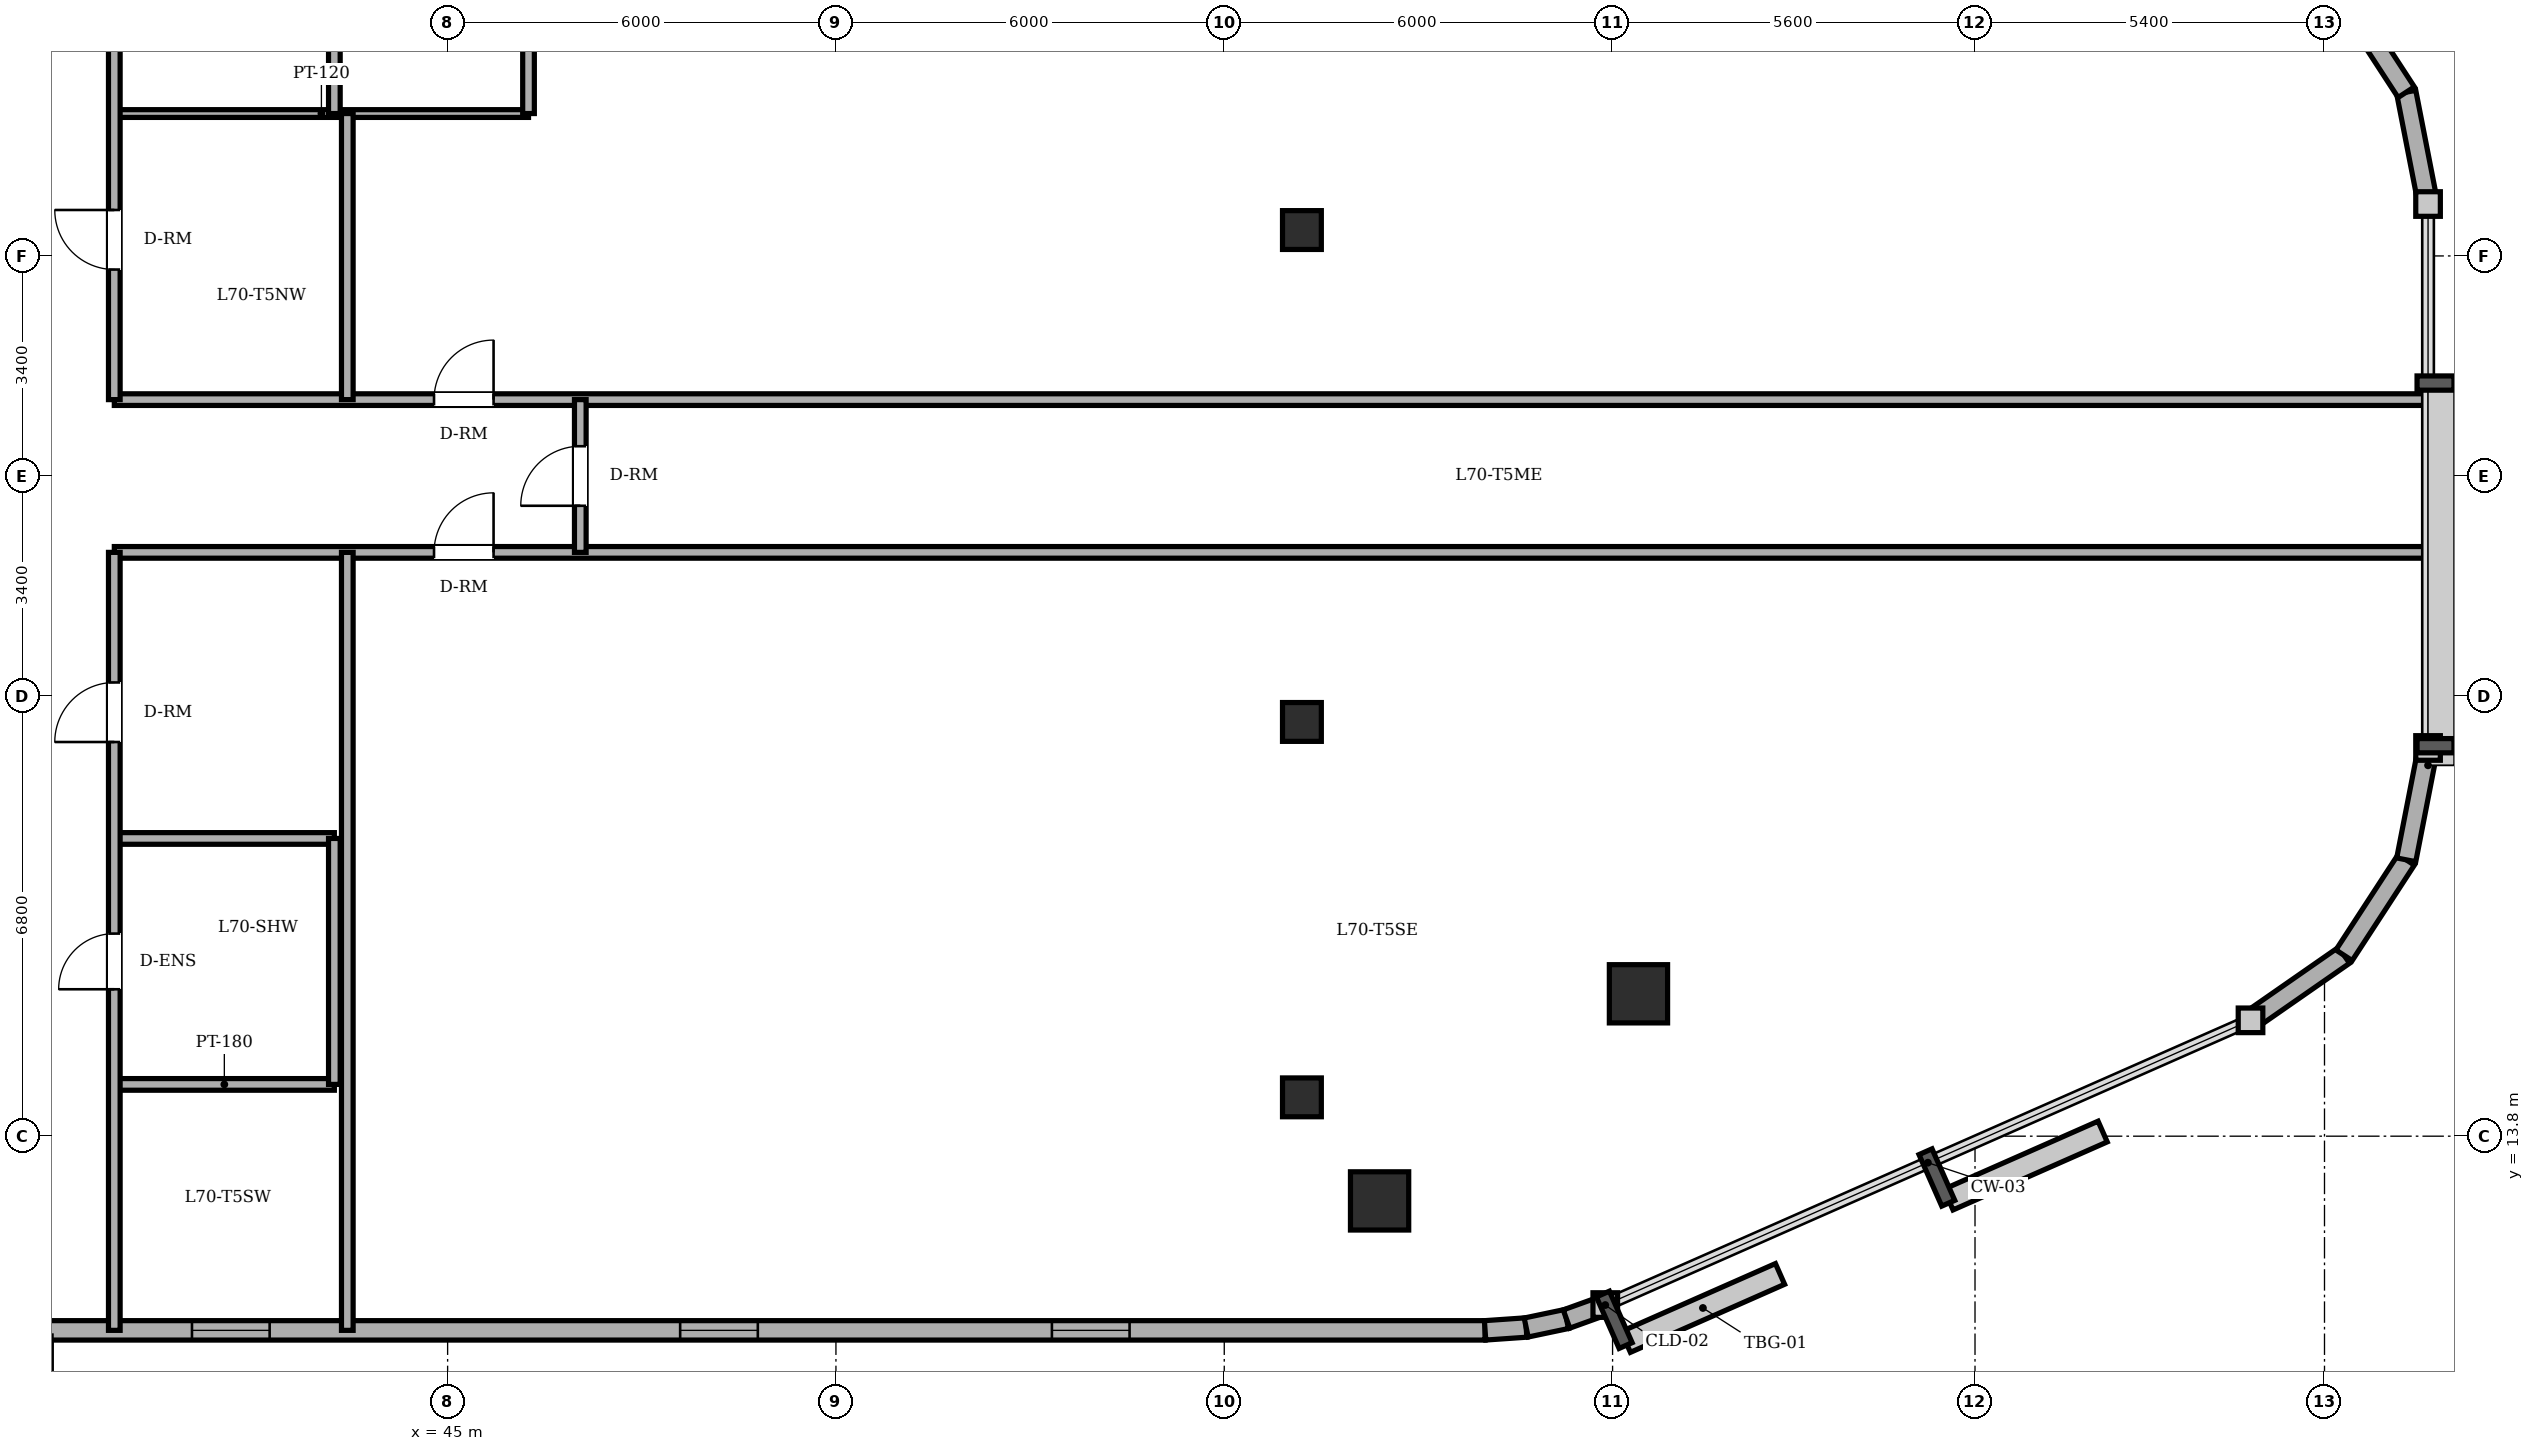
"""IFC4 building model, lengths in metres.
Left out: names, types, materials, properties, quantities, classifications, styles, units other than length and angle.
Written with IfcOpenShell. Run it as: python <this file> out.ifc"""

import sys

from ifc_helpers import new_model, si_unit, direction, frame, frame_2d, origin, origin_2d, place, context, subcontext, project, spatial, rectangle, circle, extrude, element, fill, save


model = new_model("IFC4")
c1 = context("Model", 3, precision=1e-05, world=origin(), true_north=direction((0.0, 1.0)))
c2 = subcontext(c1, "Body", "Model", "MODEL_VIEW")
j1 = project(units=[si_unit("LENGTHUNIT", "METRE"), si_unit("PLANEANGLEUNIT", "RADIAN")], contexts=[c1])
p1 = place(None, origin())
s1 = spatial("IfcSite", under=j1, at=p1, CompositionType="ELEMENT")
p2 = place(p1, origin())
s2 = spatial("IfcBuilding", under=s1, at=p2, CompositionType="ELEMENT")
p3 = place(p2, frame((0.0, 0.0, 269.75)))
s3 = spatial("IfcBuildingStorey", under=s2, at=p3, CompositionType="ELEMENT", Elevation=269.75)
for number, where, z_axis, x_axis in (
    (1, (59.4, 12.8, 0.0), (0.0, 0.0, 1.0), (1.0, 0.0, 0.0)),
    (2, (63.4, 16.0, 0.0), (0.0, 0.0, 1.0), (1.0, 0.0, 0.0)),
):
    element("IfcColumn", number, at=place(p3, frame(where, z_axis=z_axis, x_axis=x_axis)), inside=s3, PredefinedType="COLUMN", context=c2, shape_type="SweptSolid", body=[
        extrude(circle(Radius=0.45, at=origin_2d()), origin(), (0.0, 0.0, 1.0), 3.65),
    ])
for number, where, z_axis, x_axis in (
    (3, (58.2, 14.4, 0.0), (0.0, 0.0, 1.0), (1.0, 0.0, 0.0)),
    (4, (58.2, 20.2, 0.0), (0.0, 0.0, 1.0), (1.0, 0.0, 0.0)),
    (5, (58.2, 27.8, 0.0), (0.0, 0.0, 1.0), (1.0, 0.0, 0.0)),
):
    element("IfcColumn", number, at=place(p3, frame(where, z_axis=z_axis, x_axis=x_axis)), inside=s3, PredefinedType="COLUMN", context=c2, shape_type="SweptSolid", body=[
        extrude(rectangle(XDim=0.6, YDim=0.6, at=origin_2d()), origin(), (0.0, 0.0, 1.0), 3.65),
    ])
p4 = place(p3, frame((24.0, 10.8, 0.0), z_axis=(0.0, 0.0, 1.0), x_axis=(1.0, 0.0, 0.0)))
e6 = element("IfcWall", 6, at=p4, inside=s3, PredefinedType="SOLIDWALL", context=c2, shape_type="SweptSolid", body=[
    extrude(rectangle(XDim=37.03, YDim=0.3, at=frame_2d((18.515, 0.0))), origin(), (0.0, 0.0, 1.0), 3.45),
])
p5 = place(p4, frame((5.05, 0.0, 0.0)))
e7 = element("IfcOpeningElement", 7, at=p5, cuts=e6, PredefinedType="OPENING", context=c2, shape_type="SweptSolid", body=[
    extrude(rectangle(XDim=0.95, YDim=2.2, at=frame_2d((0.475, 1.1))), frame((0.0, 0.16, 0.0), z_axis=(0.0, -1.0, 0.0), x_axis=(1.0, 0.0, 0.0)), (0.0, 0.0, 1.0), 0.32),
])
p6 = place(p4, frame((10.083, 0.0, 0.85)))
e8 = element("IfcOpeningElement", 8, at=p6, cuts=e6, PredefinedType="OPENING", context=c2, shape_type="SweptSolid", body=[
    extrude(rectangle(XDim=1.2, YDim=1.6, at=frame_2d((0.6, 0.8))), frame((0.0, 0.16, 0.0), z_axis=(0.0, -1.0, 0.0), x_axis=(1.0, 0.0, 0.0)), (0.0, 0.0, 1.0), 0.32),
])
p7 = place(p4, frame((17.05, 0.0, 0.85)))
e9 = element("IfcOpeningElement", 9, at=p7, cuts=e6, PredefinedType="OPENING", context=c2, shape_type="SweptSolid", body=[
    extrude(rectangle(XDim=1.2, YDim=1.6, at=frame_2d((0.6, 0.8))), frame((0.0, 0.16, 0.0), z_axis=(0.0, -1.0, 0.0), x_axis=(1.0, 0.0, 0.0)), (0.0, 0.0, 1.0), 0.32),
])
p8 = place(p4, frame((24.593, 0.0, 0.85)))
e10 = element("IfcOpeningElement", 10, at=p8, cuts=e6, PredefinedType="OPENING", context=c2, shape_type="SweptSolid", body=[
    extrude(rectangle(XDim=1.2, YDim=1.6, at=frame_2d((0.6, 0.8))), frame((0.0, 0.16, 0.0), z_axis=(0.0, -1.0, 0.0), x_axis=(1.0, 0.0, 0.0)), (0.0, 0.0, 1.0), 0.32),
])
p9 = place(p4, frame((30.337, 0.0, 0.85)))
e11 = element("IfcOpeningElement", 11, at=p9, cuts=e6, PredefinedType="OPENING", context=c2, shape_type="SweptSolid", body=[
    extrude(rectangle(XDim=1.2, YDim=1.6, at=frame_2d((0.6, 0.8))), frame((0.0, 0.16, 0.0), z_axis=(0.0, -1.0, 0.0), x_axis=(1.0, 0.0, 0.0)), (0.0, 0.0, 1.0), 0.32),
])
p10 = place(p3, frame((61.03, 10.8, 0.0), z_axis=(0.0, 0.0, 1.0), x_axis=(0.997613959688, 0.069039028352, 0.0)))
e12 = element("IfcWall", 12, at=p10, inside=s3, PredefinedType="SOLIDWALL", context=c2, shape_type="SweptSolid", body=[
    extrude(rectangle(XDim=0.636, YDim=0.3, at=frame_2d((0.318, 0.0))), origin(), (0.0, 0.0, 1.0), 3.45),
])
p11 = place(p3, frame((61.665, 10.844, 0.0), z_axis=(0.0, 0.0, 1.0), x_axis=(0.97857012251, 0.205913854149, 0.0)))
e13 = element("IfcWall", 13, at=p11, inside=s3, PredefinedType="SOLIDWALL", context=c2, shape_type="SweptSolid", body=[
    extrude(rectangle(XDim=0.637, YDim=0.3, at=frame_2d((0.318, 0.0))), origin(), (0.0, 0.0, 1.0), 3.45),
])
p12 = place(p3, frame((62.288, 10.975, 0.0), z_axis=(0.0, 0.0, 1.0), x_axis=(0.94077491148, 0.339031806665, 0.0)))
e14 = element("IfcWall", 14, at=p12, inside=s3, PredefinedType="SOLIDWALL", context=c2, shape_type="SweptSolid", body=[
    extrude(rectangle(XDim=0.636, YDim=0.3, at=frame_2d((0.318, 0.0))), origin(), (0.0, 0.0, 1.0), 3.45),
])
p13 = place(p3, frame((72.857, 15.59, 0.0), z_axis=(0.0, 0.0, 1.0), x_axis=(0.821006966142, 0.570918174124, 0.0)))
e15 = element("IfcWall", 15, at=p13, inside=s3, PredefinedType="SOLIDWALL", context=c2, shape_type="SweptSolid", body=[
    extrude(rectangle(XDim=1.76, YDim=0.3, at=frame_2d((0.88, 0.0))), origin(), (0.0, 0.0, 1.0), 3.45),
])
for number, where, z_axis, x_axis in (
    (16, (74.302, 16.595, 0.0), (0.0, 0.0, 1.0), (0.546, 0.838, 0.0)),
    (17, (75.263, 18.07, 0.0), (0.0, 0.0, 1.0), (0.192, 0.981, 0.0)),
    (18, (75.6, 28.202, 0.0), (0.0, 0.0, 1.0), (-0.192, 0.981, 0.0)),
    (19, (75.263, 29.93, 0.0), (0.0, 0.0, 1.0), (-0.546, 0.838, 0.0)),
):
    element("IfcWall", number, at=place(p3, frame(where, z_axis=z_axis, x_axis=x_axis)), inside=s3, PredefinedType="SOLIDWALL", context=c2, shape_type="SweptSolid", body=[
        extrude(rectangle(XDim=1.76, YDim=0.3, at=frame_2d((0.88, 0.0))), origin(), (0.0, 0.0, 1.0), 3.45),
    ])
p14 = place(p3, frame((39.85, 14.6, 0.0), z_axis=(0.0, 0.0, 1.0), x_axis=(1.0, 0.0, 0.0)))
e20 = element("IfcWall", 20, at=p14, inside=s3, PredefinedType="PARTITIONING", context=c2, shape_type="SweptSolid", body=[
    extrude(rectangle(XDim=3.4, YDim=0.18, at=frame_2d((1.7, 0.0))), origin(), (0.0, 0.0, 1.0), 3.092),
])
p15 = place(p3, frame((39.85, 18.4, 0.0), z_axis=(0.0, 0.0, 1.0), x_axis=(1.0, 0.0, 0.0)))
e21 = element("IfcWall", 21, at=p15, inside=s3, PredefinedType="PARTITIONING", context=c2, shape_type="SweptSolid", body=[
    extrude(rectangle(XDim=3.4, YDim=0.18, at=frame_2d((1.7, 0.0))), origin(), (0.0, 0.0, 1.0), 3.45),
])
p16 = place(p3, frame((39.85, 22.82, 0.0), z_axis=(0.0, 0.0, 1.0), x_axis=(1.0, 0.0, 0.0)))
e22 = element("IfcWall", 22, at=p16, inside=s3, PredefinedType="PARTITIONING", context=c2, shape_type="SweptSolid", body=[
    extrude(rectangle(XDim=35.75, YDim=0.18, at=frame_2d((17.875, 0.0))), origin(), (0.0, 0.0, 1.0), 3.45),
])
p17 = place(p16, frame((4.94, 0.0, 0.0)))
e23 = element("IfcOpeningElement", 23, at=p17, cuts=e22, PredefinedType="OPENING", context=c2, shape_type="SweptSolid", body=[
    extrude(rectangle(XDim=0.92, YDim=2.1, at=frame_2d((0.46, 1.05))), frame((0.0, 0.1, 0.0), z_axis=(0.0, -1.0, 0.0), x_axis=(1.0, 0.0, 0.0)), (0.0, 0.0, 1.0), 0.2),
])
p18 = place(p3, frame((39.85, 25.18, 0.0), z_axis=(0.0, 0.0, 1.0), x_axis=(1.0, 0.0, 0.0)))
e24 = element("IfcWall", 24, at=p18, inside=s3, PredefinedType="PARTITIONING", context=c2, shape_type="SweptSolid", body=[
    extrude(rectangle(XDim=35.75, YDim=0.18, at=frame_2d((17.875, 0.0))), origin(), (0.0, 0.0, 1.0), 3.45),
])
p19 = place(p18, frame((4.94, 0.0, 0.0)))
e25 = element("IfcOpeningElement", 25, at=p19, cuts=e24, PredefinedType="OPENING", context=c2, shape_type="SweptSolid", body=[
    extrude(rectangle(XDim=0.92, YDim=2.1, at=frame_2d((0.46, 1.05))), frame((0.0, 0.1, 0.0), z_axis=(0.0, -1.0, 0.0), x_axis=(1.0, 0.0, 0.0)), (0.0, 0.0, 1.0), 0.2),
])
p20 = place(p3, frame((39.85, 29.6, 0.0), z_axis=(0.0, 0.0, 1.0), x_axis=(1.0, 0.0, 0.0)))
e26 = element("IfcWall", 26, at=p20, inside=s3, PredefinedType="PARTITIONING", context=c2, shape_type="SweptSolid", body=[
    extrude(rectangle(XDim=6.4, YDim=0.12, at=frame_2d((3.2, 0.0))), origin(), (0.0, 0.0, 1.0), 3.45),
])
p21 = place(p3, frame((39.85, 10.8, 0.0), z_axis=(0.0, 0.0, 1.0), x_axis=(0.0, 1.0, 0.0)))
e27 = element("IfcWall", 27, at=p21, inside=s3, PredefinedType="PARTITIONING", context=c2, shape_type="SweptSolid", body=[
    extrude(rectangle(XDim=12.02, YDim=0.18, at=frame_2d((6.01, 0.0))), origin(), (0.0, 0.0, 1.0), 3.45),
])
p22 = place(p21, frame((5.27, 0.0, 0.0)))
e28 = element("IfcOpeningElement", 28, at=p22, cuts=e27, PredefinedType="OPENING", context=c2, shape_type="SweptSolid", body=[
    extrude(rectangle(XDim=0.86, YDim=2.1, at=frame_2d((0.43, 1.05))), frame((0.0, 0.1, 0.0), z_axis=(0.0, -1.0, 0.0), x_axis=(1.0, 0.0, 0.0)), (0.0, 0.0, 1.0), 0.2),
])
p23 = place(p21, frame((9.09, 0.0, 0.0)))
e29 = element("IfcOpeningElement", 29, at=p23, cuts=e27, PredefinedType="OPENING", context=c2, shape_type="SweptSolid", body=[
    extrude(rectangle(XDim=0.92, YDim=2.1, at=frame_2d((0.46, 1.05))), frame((0.0, 0.1, 0.0), z_axis=(0.0, -1.0, 0.0), x_axis=(1.0, 0.0, 0.0)), (0.0, 0.0, 1.0), 0.2),
])
p24 = place(p3, frame((39.85, 25.18, 0.0), z_axis=(0.0, 0.0, 1.0), x_axis=(0.0, 1.0, 0.0)))
e30 = element("IfcWall", 30, at=p24, inside=s3, PredefinedType="PARTITIONING", context=c2, shape_type="SweptSolid", body=[
    extrude(rectangle(XDim=12.02, YDim=0.18, at=frame_2d((6.01, 0.0))), origin(), (0.0, 0.0, 1.0), 3.45),
])
p25 = place(p24, frame((5.87, 0.0, 0.0)))
e31 = element("IfcOpeningElement", 31, at=p25, cuts=e30, PredefinedType="OPENING", context=c2, shape_type="SweptSolid", body=[
    extrude(rectangle(XDim=0.9, YDim=2.1, at=frame_2d((0.45, 1.05))), frame((0.0, 0.1, 0.0), z_axis=(0.0, -1.0, 0.0), x_axis=(1.0, 0.0, 0.0)), (0.0, 0.0, 1.0), 0.2),
])
p26 = place(p24, frame((2.01, 0.0, 0.0)))
e32 = element("IfcOpeningElement", 32, at=p26, cuts=e30, PredefinedType="OPENING", context=c2, shape_type="SweptSolid", body=[
    extrude(rectangle(XDim=0.92, YDim=2.1, at=frame_2d((0.46, 1.05))), frame((0.0, 0.1, 0.0), z_axis=(0.0, -1.0, 0.0), x_axis=(1.0, 0.0, 0.0)), (0.0, 0.0, 1.0), 0.2),
])
for number, where, z_axis, x_axis in (
    (33, (43.25, 14.6, 0.0), (0.0, 0.0, 1.0), (0.0, 1.0, 0.0)),
    (34, (43.25, 29.6, 0.0), (0.0, 0.0, 1.0), (0.0, 1.0, 0.0)),
):
    element("IfcWall", number, at=place(p3, frame(where, z_axis=z_axis, x_axis=x_axis)), inside=s3, PredefinedType="PARTITIONING", context=c2, shape_type="SweptSolid", body=[
        extrude(rectangle(XDim=3.8, YDim=0.18, at=frame_2d((1.9, 0.0))), origin(), (0.0, 0.0, 1.0), 3.45),
    ])
p27 = place(p3, frame((43.45, 10.8, 0.0), z_axis=(0.0, 0.0, 1.0), x_axis=(0.0, 1.0, 0.0)))
e35 = element("IfcWall", 35, at=p27, inside=s3, PredefinedType="PARTITIONING", context=c2, shape_type="SweptSolid", body=[
    extrude(rectangle(XDim=12.02, YDim=0.18, at=frame_2d((6.01, 0.0))), origin(), (0.0, 0.0, 1.0), 3.45),
])
p28 = place(p3, frame((43.45, 25.18, 0.0), z_axis=(0.0, 0.0, 1.0), x_axis=(0.0, 1.0, 0.0)))
e36 = element("IfcWall", 36, at=p28, inside=s3, PredefinedType="PARTITIONING", context=c2, shape_type="SweptSolid", body=[
    extrude(rectangle(XDim=4.42, YDim=0.18, at=frame_2d((2.21, 0.0))), origin(), (0.0, 0.0, 1.0), 3.45),
])
p29 = place(p3, frame((46.25, 29.6, 0.0), z_axis=(0.0, 0.0, 1.0), x_axis=(0.0, 1.0, 0.0)))
e37 = element("IfcWall", 37, at=p29, inside=s3, PredefinedType="PARTITIONING", context=c2, shape_type="SweptSolid", body=[
    extrude(rectangle(XDim=3.8, YDim=0.18, at=frame_2d((1.9, 0.0))), origin(), (0.0, 0.0, 1.0), 3.45),
])
p30 = place(p29, frame((1.44, 0.0, 0.0)))
e38 = element("IfcOpeningElement", 38, at=p30, cuts=e37, PredefinedType="OPENING", context=c2, shape_type="SweptSolid", body=[
    extrude(rectangle(XDim=0.92, YDim=2.1, at=frame_2d((0.46, 1.05))), frame((0.0, 0.1, 0.0), z_axis=(0.0, -1.0, 0.0), x_axis=(1.0, 0.0, 0.0)), (0.0, 0.0, 1.0), 0.2),
])
p31 = place(p3, frame((47.05, 22.82, 0.0), z_axis=(0.0, 0.0, 1.0), x_axis=(0.0, 1.0, 0.0)))
e39 = element("IfcWall", 39, at=p31, inside=s3, PredefinedType="PARTITIONING", context=c2, shape_type="SweptSolid", body=[
    extrude(rectangle(XDim=2.36, YDim=0.18, at=frame_2d((1.18, 0.0))), origin(), (0.0, 0.0, 1.0), 3.45),
])
p32 = place(p31, frame((0.72, 0.0, 0.0)))
e40 = element("IfcOpeningElement", 40, at=p32, cuts=e39, PredefinedType="OPENING", context=c2, shape_type="SweptSolid", body=[
    extrude(rectangle(XDim=0.92, YDim=2.1, at=frame_2d((0.46, 1.05))), frame((0.0, 0.1, 0.0), z_axis=(0.0, -1.0, 0.0), x_axis=(1.0, 0.0, 0.0)), (0.0, 0.0, 1.0), 0.2),
])
p33 = place(p7, origin())
e41 = element("IfcWindow", 41, at=p33, inside=s3, PartitioningType="SINGLE_PANEL", PredefinedType="WINDOW", context=c2, shape_type="SweptSolid", body=[
    extrude(rectangle(XDim=1.2, YDim=1.6, at=frame_2d((0.6, 0.8))), frame((0.0, 0.03, 0.0), z_axis=(0.0, -1.0, 0.0), x_axis=(1.0, 0.0, 0.0)), (0.0, 0.0, 1.0), 0.06),
])
fill(e9, e41)
p34 = place(p8, origin())
e42 = element("IfcWindow", 42, at=p34, inside=s3, PartitioningType="SINGLE_PANEL", PredefinedType="WINDOW", context=c2, shape_type="SweptSolid", body=[
    extrude(rectangle(XDim=1.2, YDim=1.6, at=frame_2d((0.6, 0.8))), frame((0.0, 0.03, 0.0), z_axis=(0.0, -1.0, 0.0), x_axis=(1.0, 0.0, 0.0)), (0.0, 0.0, 1.0), 0.06),
])
fill(e10, e42)
p35 = place(p9, origin())
e43 = element("IfcWindow", 43, at=p35, inside=s3, PartitioningType="SINGLE_PANEL", PredefinedType="WINDOW", context=c2, shape_type="SweptSolid", body=[
    extrude(rectangle(XDim=1.2, YDim=1.6, at=frame_2d((0.6, 0.8))), frame((0.0, 0.03, 0.0), z_axis=(0.0, -1.0, 0.0), x_axis=(1.0, 0.0, 0.0)), (0.0, 0.0, 1.0), 0.06),
])
fill(e11, e43)
p36 = place(p22, origin())
e44 = element("IfcDoor", 44, at=p36, inside=s3, OperationType="SINGLE_SWING_LEFT", PredefinedType="DOOR", context=c2, shape_type="SweptSolid", body=[
    extrude(rectangle(XDim=0.86, YDim=2.1, at=frame_2d((0.43, 1.05))), frame((0.0, 0.025, 0.0), z_axis=(0.0, -1.0, 0.0), x_axis=(1.0, 0.0, 0.0)), (0.0, 0.0, 1.0), 0.05),
])
fill(e28, e44)
p37 = place(p26, origin())
e45 = element("IfcDoor", 45, at=p37, inside=s3, OperationType="SINGLE_SWING_RIGHT", PredefinedType="DOOR", context=c2, shape_type="SweptSolid", body=[
    extrude(rectangle(XDim=0.92, YDim=2.1, at=frame_2d((0.46, 1.05))), frame((0.0, 0.025, 0.0), z_axis=(0.0, -1.0, 0.0), x_axis=(1.0, 0.0, 0.0)), (0.0, 0.0, 1.0), 0.05),
])
fill(e32, e45)
p38 = place(p23, origin())
e46 = element("IfcDoor", 46, at=p38, inside=s3, OperationType="SINGLE_SWING_LEFT", PredefinedType="DOOR", context=c2, shape_type="SweptSolid", body=[
    extrude(rectangle(XDim=0.92, YDim=2.1, at=frame_2d((0.46, 1.05))), frame((0.0, 0.025, 0.0), z_axis=(0.0, -1.0, 0.0), x_axis=(1.0, 0.0, 0.0)), (0.0, 0.0, 1.0), 0.05),
])
fill(e29, e46)
p39 = place(p19, origin())
e47 = element("IfcDoor", 47, at=p39, inside=s3, OperationType="SINGLE_SWING_RIGHT", PredefinedType="DOOR", context=c2, shape_type="SweptSolid", body=[
    extrude(rectangle(XDim=0.92, YDim=2.1, at=frame_2d((0.46, 1.05))), frame((0.0, 0.025, 0.0), z_axis=(0.0, -1.0, 0.0), x_axis=(1.0, 0.0, 0.0)), (0.0, 0.0, 1.0), 0.05),
])
fill(e25, e47)
p40 = place(p32, origin())
e48 = element("IfcDoor", 48, at=p40, inside=s3, OperationType="SINGLE_SWING_LEFT", PredefinedType="DOOR", context=c2, shape_type="SweptSolid", body=[
    extrude(rectangle(XDim=0.92, YDim=2.1, at=frame_2d((0.46, 1.05))), frame((0.0, 0.025, 0.0), z_axis=(0.0, -1.0, 0.0), x_axis=(1.0, 0.0, 0.0)), (0.0, 0.0, 1.0), 0.05),
])
fill(e40, e48)
p41 = place(p17, origin())
e49 = element("IfcDoor", 49, at=p41, inside=s3, OperationType="SINGLE_SWING_RIGHT", PredefinedType="DOOR", context=c2, shape_type="SweptSolid", body=[
    extrude(rectangle(XDim=0.92, YDim=2.1, at=frame_2d((0.46, 1.05))), frame((0.0, 0.025, 0.0), z_axis=(0.0, -1.0, 0.0), x_axis=(1.0, 0.0, 0.0)), (0.0, 0.0, 1.0), 0.05),
])
fill(e23, e49)
save(model, sys.argv[1])
